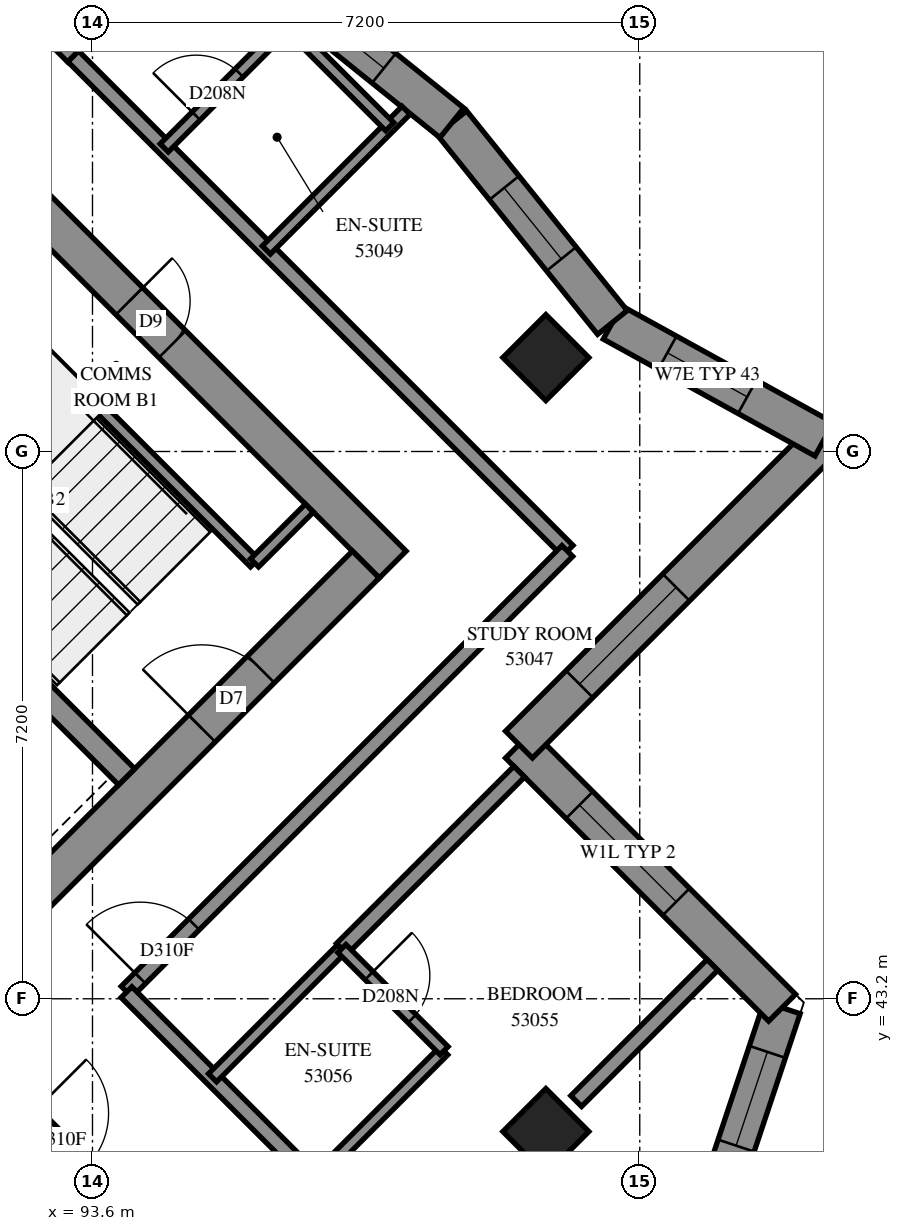
"""IFC4 building model, lengths in metres.
Left out: names, types, materials, properties, quantities, classifications, styles, units other than length and angle.
Written with IfcOpenShell. Run it as: python <this file> out.ifc"""

import sys

from ifc_helpers import new_model, si_unit, direction, frame, frame_2d, origin, origin_2d, place, context, subcontext, project, spatial, polyline, rectangle, outline, extrude, element, fill, save


model = new_model("IFC4")
c1 = context("Model", 3, precision=1e-05, world=origin(), true_north=direction((0.0, 1.0)))
c2 = subcontext(c1, "Body", "Model", "MODEL_VIEW")
j1 = project(units=[si_unit("LENGTHUNIT", "METRE"), si_unit("PLANEANGLEUNIT", "RADIAN")], contexts=[c1])
p1 = place(None, origin())
s1 = spatial("IfcSite", under=j1, at=p1, CompositionType="ELEMENT")
p2 = place(p1, origin())
s2 = spatial("IfcBuilding", under=s1, at=p2, CompositionType="ELEMENT")
p3 = place(p2, frame((0.0, 0.0, 196.4)))
s3 = spatial("IfcBuildingStorey", under=s2, at=p3, CompositionType="ELEMENT", Elevation=196.4)
for number, where, z_axis, x_axis in (
    (1, (99.565, 51.635, 0.0), (0.0, 0.0, 1.0), (0.707, -0.707, 0.0)),
    (2, (99.565, 41.453, 0.0), (0.0, 0.0, 1.0), (0.707, -0.707, 0.0)),
):
    element("IfcColumn", number, at=place(p3, frame(where, z_axis=z_axis, x_axis=x_axis)), inside=s3, PredefinedType="COLUMN", context=c2, shape_type="SweptSolid", body=[
        extrude(rectangle(XDim=0.8, YDim=0.8, at=origin_2d()), origin(), (0.0, 0.0, 1.0), 3.1),
    ])
p4 = place(p3, frame((86.66, 59.802, -0.3), z_axis=(0.0, 0.0, 1.0), x_axis=(0.7071067812, -0.7071067812, 0.0)))
e3 = element("IfcWall", 3, at=p4, inside=s3, PredefinedType="SHEAR", context=c2, shape_type="SweptSolid", body=[
    extrude(rectangle(XDim=15.4, YDim=0.5, at=frame_2d((7.7, 0.0))), origin(), (0.0, 0.0, 1.0), 2.7),
])
p5 = place(p4, frame((10.5, 0.0, 0.3)))
e4 = element("IfcOpeningElement", 4, at=p5, cuts=e3, PredefinedType="OPENING", context=c2, shape_type="SweptSolid", body=[
    extrude(rectangle(XDim=0.8, YDim=2.1, at=frame_2d((0.4, 1.05))), frame((0.0, 0.26, 0.0), z_axis=(0.0, -1.0, 0.0), x_axis=(1.0, 0.0, 0.0)), (0.0, 0.0, 1.0), 0.52),
])
p6 = place(p3, frame((87.013, 38.731, -0.3), z_axis=(0.0, 0.0, 1.0), x_axis=(0.7071067812, 0.7071067812, 0.0)))
e5 = element("IfcWall", 5, at=p6, inside=s3, PredefinedType="SHEAR", context=c2, shape_type="SweptSolid", body=[
    extrude(rectangle(XDim=14.4, YDim=0.5, at=frame_2d((7.2, 0.0))), origin(), (0.0, 0.0, 1.0), 2.7),
])
p7 = place(p6, frame((4.55, 0.0, 0.3)))
e6 = element("IfcOpeningElement", 6, at=p7, cuts=e5, PredefinedType="OPENING", context=c2, shape_type="SweptSolid", body=[
    extrude(rectangle(XDim=1.1, YDim=2.1, at=frame_2d((0.55, 1.05))), frame((0.0, 0.26, 0.0), z_axis=(0.0, -1.0, 0.0), x_axis=(1.0, 0.0, 0.0)), (0.0, 0.0, 1.0), 0.52),
])
p8 = place(p6, frame((11.35, 0.0, 0.3)))
e7 = element("IfcOpeningElement", 7, at=p8, cuts=e5, PredefinedType="OPENING", context=c2, shape_type="SweptSolid", body=[
    extrude(rectangle(XDim=1.1, YDim=2.1, at=frame_2d((0.55, 1.05))), frame((0.0, 0.26, 0.0), z_axis=(0.0, -1.0, 0.0), x_axis=(1.0, 0.0, 0.0)), (0.0, 0.0, 1.0), 0.52),
])
p9 = place(p3, frame((88.958, 51.211, 0.0), z_axis=(0.0, 0.0, 1.0), x_axis=(0.7070998367, -0.7071137256, 0.0)))
e8 = element("IfcWall", 8, at=p9, inside=s3, PredefinedType="SOLIDWALL", context=c2, shape_type="SweptSolid", body=[
    extrude(rectangle(XDim=7.2, YDim=0.3, at=frame_2d((3.6, 0.0))), origin(), (0.0, 0.0, 1.0), 3.1),
])
p10 = place(p3, frame((101.062, 38.252, 0.0), z_axis=(0.0, 0.0, 1.0), x_axis=(0.3162395484, 0.9486793705, 0.0)))
e9 = element("IfcWall", 9, at=p10, inside=s3, PredefinedType="SOLIDWALL", context=c2, shape_type="SweptSolid", body=[
    extrude(outline(polyline([(-0.12, -0.25), (5.247, -0.25), (4.938, 0.25), (0.12, 0.25), (-0.12, -0.25)])), origin(), (0.0, 0.0, 1.0), 3.1),
])
p11 = place(p10, frame((1.68, 0.0, 0.45)))
e10 = element("IfcOpeningElement", 10, at=p11, cuts=e9, PredefinedType="OPENING", context=c2, shape_type="SweptSolid", body=[
    extrude(rectangle(XDim=1.3, YDim=2.5, at=frame_2d((0.65, 1.25))), frame((0.0, 0.26, 0.0), z_axis=(0.0, -1.0, 0.0), x_axis=(1.0, 0.0, 0.0)), (0.0, 0.0, 1.0), 0.52),
])
p12 = place(p10, frame((3.18, 0.0, 0.45)))
e11 = element("IfcOpeningElement", 11, at=p12, cuts=e9, PredefinedType="OPENING", context=c2, shape_type="SweptSolid", body=[
    extrude(rectangle(XDim=1.3, YDim=2.5, at=frame_2d((0.65, 1.25))), frame((0.0, 0.26, 0.0), z_axis=(0.0, -1.0, 0.0), x_axis=(1.0, 0.0, 0.0)), (0.0, 0.0, 1.0), 0.52),
])
p13 = place(p3, frame((102.673, 43.083, 0.0), z_axis=(0.0, 0.0, 1.0), x_axis=(-0.7071067812, 0.7071067812, 0.0)))
e12 = element("IfcWall", 12, at=p13, inside=s3, PredefinedType="SOLIDWALL", context=c2, shape_type="SweptSolid", body=[
    extrude(outline(polyline([(-0.154, -0.25), (4.646, -0.25), (5.146, 0.25), (0.154, 0.25), (-0.154, -0.25)])), origin(), (0.0, 0.0, 1.0), 3.1),
])
p14 = place(p13, frame((1.97, 0.0, 0.6)))
e13 = element("IfcOpeningElement", 13, at=p14, cuts=e12, PredefinedType="OPENING", context=c2, shape_type="SweptSolid", body=[
    extrude(rectangle(XDim=1.8, YDim=1.9, at=frame_2d((0.9, 0.95))), frame((0.0, 0.26, 0.0), z_axis=(0.0, -1.0, 0.0), x_axis=(1.0, 0.0, 0.0)), (0.0, 0.0, 1.0), 0.52),
])
p15 = place(p3, frame((99.211, 46.544, 0.0), z_axis=(0.0, 0.0, 1.0), x_axis=(0.7071067812, 0.7071067812, 0.0)))
e14 = element("IfcWall", 14, at=p15, inside=s3, PredefinedType="SOLIDWALL", context=c2, shape_type="SweptSolid", body=[
    extrude(outline(polyline([(0.25, -0.25), (6.011, -0.25), (5.346, 0.25), (-0.25, 0.25), (0.25, -0.25)])), origin(), (0.0, 0.0, 1.0), 3.1),
])
p16 = place(p15, frame((1.125, 0.0, 0.6)))
e15 = element("IfcOpeningElement", 15, at=p16, cuts=e14, PredefinedType="OPENING", context=c2, shape_type="SweptSolid", body=[
    extrude(rectangle(XDim=1.8, YDim=1.9, at=frame_2d((0.9, 0.95))), frame((0.0, 0.26, 0.0), z_axis=(0.0, -1.0, 0.0), x_axis=(1.0, 0.0, 0.0)), (0.0, 0.0, 1.0), 0.52),
])
p17 = place(p3, frame((103.227, 50.56, 0.0), z_axis=(0.0, 0.0, 1.0), x_axis=(-0.8754584945, 0.483293311, 0.0)))
e16 = element("IfcWall", 16, at=p17, inside=s3, PredefinedType="SOLIDWALL", context=c2, shape_type="SweptSolid", body=[
    extrude(outline(polyline([(-0.332, -0.25), (3.133, -0.25), (3.232, 0.25), (0.332, 0.25), (-0.332, -0.25)])), origin(), (0.0, 0.0, 1.0), 3.1),
])
p18 = place(p17, frame((1.157, 0.0, 0.45)))
e17 = element("IfcOpeningElement", 17, at=p18, cuts=e16, PredefinedType="OPENING", context=c2, shape_type="SweptSolid", body=[
    extrude(rectangle(XDim=1.2, YDim=2.5, at=frame_2d((0.6, 1.25))), frame((0.0, 0.26, 0.0), z_axis=(0.0, -1.0, 0.0), x_axis=(1.0, 0.0, 0.0)), (0.0, 0.0, 1.0), 0.52),
])
p19 = place(p3, frame((100.441, 52.098, 0.0), z_axis=(0.0, 0.0, 1.0), x_axis=(-0.6267656926, 0.7792077814, 0.0)))
e18 = element("IfcWall", 18, at=p19, inside=s3, PredefinedType="SOLIDWALL", context=c2, shape_type="SweptSolid", body=[
    extrude(outline(polyline([(0.049, -0.25), (3.398, -0.25), (3.344, 0.25), (-0.049, 0.25), (0.049, -0.25)])), origin(), (0.0, 0.0, 1.0), 3.1),
])
p20 = place(p19, frame((1.072, 0.0, 0.45)))
e19 = element("IfcOpeningElement", 19, at=p20, cuts=e18, PredefinedType="OPENING", context=c2, shape_type="SweptSolid", body=[
    extrude(rectangle(XDim=1.2, YDim=2.5, at=frame_2d((0.6, 1.25))), frame((0.0, 0.26, 0.0), z_axis=(0.0, -1.0, 0.0), x_axis=(1.0, 0.0, 0.0)), (0.0, 0.0, 1.0), 0.52),
])
p21 = place(p3, frame((98.328, 54.724, 0.0), z_axis=(0.0, 0.0, 1.0), x_axis=(-0.7792172545, 0.6267539152, 0.0)))
e20 = element("IfcWall", 20, at=p21, inside=s3, PredefinedType="SOLIDWALL", context=c2, shape_type="SweptSolid", body=[
    extrude(outline(polyline([(-0.027, -0.25), (3.322, -0.25), (3.376, 0.25), (0.027, 0.25), (-0.027, -0.25)])), origin(), (0.0, 0.0, 1.0), 3.1),
])
p22 = place(p21, frame((1.147, 0.0, 0.45)))
e21 = element("IfcOpeningElement", 21, at=p22, cuts=e20, PredefinedType="OPENING", context=c2, shape_type="SweptSolid", body=[
    extrude(rectangle(XDim=1.2, YDim=2.5, at=frame_2d((0.6, 1.25))), frame((0.0, 0.26, 0.0), z_axis=(0.0, -1.0, 0.0), x_axis=(1.0, 0.0, 0.0)), (0.0, 0.0, 1.0), 0.52),
])
p23 = place(p3, frame((91.313, 53.354, 0.0), z_axis=(0.0, 0.0, 1.0), x_axis=(0.7071147811, -0.7070987812, 0.0)))
e22 = element("IfcWall", 22, at=p23, inside=s3, PredefinedType="PARTITIONING", context=c2, shape_type="SweptSolid", body=[
    extrude(rectangle(XDim=6.25, YDim=0.15, at=frame_2d((3.125, 0.0))), origin(), (0.0, 0.0, 1.0), 3.1),
])
p24 = place(p3, frame((95.732, 48.934, 0.0), z_axis=(0.0, 0.0, 1.0), x_axis=(0.7071067812, 0.7071067812, 0.0)))
e23 = element("IfcWall", 23, at=p24, inside=s3, PredefinedType="PARTITIONING", context=c2, shape_type="SweptSolid", body=[
    extrude(rectangle(XDim=1.02, YDim=0.15, at=frame_2d((0.51, 0.0))), origin(), (0.0, 0.0, 1.0), 3.1),
])
p25 = place(p3, frame((93.346, 55.599, 0.0), z_axis=(0.0, 0.0, 1.0), x_axis=(0.7071067812, -0.7071067812, 0.0)))
e24 = element("IfcWall", 24, at=p25, inside=s3, PredefinedType="PARTITIONING", context=c2, shape_type="SweptSolid", body=[
    extrude(rectangle(XDim=9.201, YDim=0.2, at=frame_2d((4.601, 0.0))), origin(), (0.0, 0.0, 1.0), 3.1),
])
p26 = place(p3, frame((94.049, 43.293, 0.0), z_axis=(0.0, 0.0, 1.0), x_axis=(0.7071067812, 0.7071067812, 0.0)))
e25 = element("IfcWall", 25, at=p26, inside=s3, PredefinedType="PARTITIONING", context=c2, shape_type="SweptSolid", body=[
    extrude(rectangle(XDim=8.2, YDim=0.2, at=frame_2d((4.1, 0.0))), origin(), (0.0, 0.0, 1.0), 3.1),
])
p27 = place(p26, frame((0.252, 0.0, 0.0)))
e26 = element("IfcOpeningElement", 26, at=p27, cuts=e25, PredefinedType="OPENING", context=c2, shape_type="SweptSolid", body=[
    extrude(rectangle(XDim=1.0, YDim=2.1, at=frame_2d((0.5, 1.05))), frame((0.0, 0.11, 0.0), z_axis=(0.0, -1.0, 0.0), x_axis=(1.0, 0.0, 0.0)), (0.0, 0.0, 1.0), 0.22),
])
p28 = place(p3, frame((94.047, 43.287, 0.0), z_axis=(0.0, 0.0, 1.0), x_axis=(0.7071067812, -0.7071067812, 0.0)))
e27 = element("IfcWall", 27, at=p28, inside=s3, PredefinedType="PARTITIONING", context=c2, shape_type="SweptSolid", body=[
    extrude(rectangle(XDim=5.199, YDim=0.2, at=frame_2d((2.599, 0.0))), origin(), (0.0, 0.0, 1.0), 3.1),
])
p29 = place(p28, frame((3.898, 0.0, 0.0)))
e28 = element("IfcOpeningElement", 28, at=p29, cuts=e27, PredefinedType="OPENING", context=c2, shape_type="SweptSolid", body=[
    extrude(rectangle(XDim=0.9, YDim=2.1, at=frame_2d((0.45, 1.05))), frame((0.0, 0.11, 0.0), z_axis=(0.0, -1.0, 0.0), x_axis=(1.0, 0.0, 0.0)), (0.0, 0.0, 1.0), 0.22),
])
p30 = place(p3, frame((92.633, 41.873, 0.0), z_axis=(0.0, 0.0, 1.0), x_axis=(0.7071067812, -0.7071067812, 0.0)))
e29 = element("IfcWall", 29, at=p30, inside=s3, PredefinedType="PARTITIONING", context=c2, shape_type="SweptSolid", body=[
    extrude(rectangle(XDim=5.199, YDim=0.2, at=frame_2d((2.599, 0.0))), origin(), (0.0, 0.0, 1.0), 3.1),
])
p31 = place(p30, frame((0.253, 0.0, 0.0)))
e30 = element("IfcOpeningElement", 30, at=p31, cuts=e29, PredefinedType="OPENING", context=c2, shape_type="SweptSolid", body=[
    extrude(rectangle(XDim=1.0, YDim=2.1, at=frame_2d((0.5, 1.05))), frame((0.0, 0.11, 0.0), z_axis=(0.0, -1.0, 0.0), x_axis=(1.0, 0.0, 0.0)), (0.0, 0.0, 1.0), 0.22),
])
p32 = place(p30, frame((3.948, 0.0, 0.0)))
e31 = element("IfcOpeningElement", 31, at=p32, cuts=e29, PredefinedType="OPENING", context=c2, shape_type="SweptSolid", body=[
    extrude(rectangle(XDim=0.9, YDim=2.1, at=frame_2d((0.45, 1.05))), frame((0.0, 0.11, 0.0), z_axis=(0.0, -1.0, 0.0), x_axis=(1.0, 0.0, 0.0)), (0.0, 0.0, 1.0), 0.22),
])
p33 = place(p3, frame((96.88, 43.856, 0.0), z_axis=(0.0, 0.0, 1.0), x_axis=(0.7074098182, 0.7068036142, 0.0)))
e32 = element("IfcWall", 32, at=p33, inside=s3, PredefinedType="PARTITIONING", context=c2, shape_type="SweptSolid", body=[
    extrude(rectangle(XDim=3.299, YDim=0.2, at=frame_2d((1.65, 0.0))), origin(), (0.0, 0.0, 1.0), 3.1),
])
p34 = place(p3, frame((95.887, 53.051, 0.0), z_axis=(0.0, 0.0, 1.0), x_axis=(0.7070875415, 0.7071260204, 0.0)))
e33 = element("IfcWall", 33, at=p34, inside=s3, PredefinedType="PARTITIONING", context=c2, shape_type="SweptSolid", body=[
    extrude(rectangle(XDim=2.599, YDim=0.15, at=frame_2d((1.299, 0.0))), origin(), (0.0, 0.0, 1.0), 3.1),
])
p35 = place(p3, frame((99.964, 41.854, 0.0), z_axis=(0.0, 0.0, 1.0), x_axis=(0.7071265121, 0.7070870497, 0.0)))
e34 = element("IfcWall", 34, at=p35, inside=s3, PredefinedType="PARTITIONING", context=c2, shape_type="SweptSolid", body=[
    extrude(rectangle(XDim=2.534, YDim=0.2, at=frame_2d((1.267, 0.0))), origin(), (0.0, 0.0, 1.0), 3.1),
])
for number, where, z_axis, x_axis in (
    (35, (96.523, 40.817, 0.0), (0.0, 0.0, 1.0), (0.707, 0.707, 0.0)),
    (36, (95.179, 42.161, 0.0), (0.0, 0.0, 1.0), (0.707, 0.707, 0.0)),
):
    element("IfcWall", number, at=place(p3, frame(where, z_axis=z_axis, x_axis=x_axis)), inside=s3, PredefinedType="PARTITIONING", context=c2, shape_type="SweptSolid", body=[
        extrude(rectangle(XDim=2.401, YDim=0.15, at=frame_2d((1.201, 0.0))), origin(), (0.0, 0.0, 1.0), 3.1),
    ])
p36 = place(p3, frame((94.544, 54.394, 0.0), z_axis=(0.0, 0.0, 1.0), x_axis=(0.7070858847, 0.7071276771, 0.0)))
e37 = element("IfcWall", 37, at=p36, inside=s3, PredefinedType="PARTITIONING", context=c2, shape_type="SweptSolid", body=[
    extrude(rectangle(XDim=2.393, YDim=0.15, at=frame_2d((1.196, 0.0))), origin(), (0.0, 0.0, 1.0), 3.1),
])
p37 = place(p36, frame((0.594, 0.0, 0.0)))
e38 = element("IfcOpeningElement", 38, at=p37, cuts=e37, PredefinedType="OPENING", context=c2, shape_type="SweptSolid", body=[
    extrude(rectangle(XDim=0.8, YDim=2.1, at=frame_2d((0.4, 1.05))), frame((0.0, 0.085, 0.0), z_axis=(0.0, -1.0, 0.0), x_axis=(1.0, 0.0, 0.0)), (0.0, 0.0, 1.0), 0.17),
])
p38 = place(p3, frame((96.167, 56.017, 0.0), z_axis=(0.0, 0.0, 1.0), x_axis=(0.7071067812, -0.7071067812, 0.0)))
e39 = element("IfcWall", 39, at=p38, inside=s3, PredefinedType="PARTITIONING", context=c2, shape_type="SweptSolid", body=[
    extrude(rectangle(XDim=1.901, YDim=0.15, at=frame_2d((0.95, 0.0))), origin(), (0.0, 0.0, 1.0), 3.1),
])
p39 = place(p3, frame((96.881, 43.861, 0.0), z_axis=(0.0, 0.0, 1.0), x_axis=(0.7071067812, -0.7071067812, 0.0)))
e40 = element("IfcWall", 40, at=p39, inside=s3, PredefinedType="PARTITIONING", context=c2, shape_type="SweptSolid", body=[
    extrude(rectangle(XDim=1.901, YDim=0.15, at=frame_2d((0.95, 0.0))), origin(), (0.0, 0.0, 1.0), 3.1),
])
p40 = place(p39, frame((0.505, 0.0, 0.0)))
e41 = element("IfcOpeningElement", 41, at=p40, cuts=e40, PredefinedType="OPENING", context=c2, shape_type="SweptSolid", body=[
    extrude(rectangle(XDim=0.8, YDim=2.1, at=frame_2d((0.4, 1.05))), frame((0.0, 0.085, 0.0), z_axis=(0.0, -1.0, 0.0), x_axis=(1.0, 0.0, 0.0)), (0.0, 0.0, 1.0), 0.17),
])
p41 = place(p3, frame((92.311, 56.627, 0.0), z_axis=(0.0, 0.0, 1.0), x_axis=(0.7077922938, -0.7064206033, 0.0)))
e42 = element("IfcWall", 42, at=p41, inside=s3, PredefinedType="PARTITIONING", context=c2, shape_type="SweptSolid", body=[
    extrude(rectangle(XDim=1.458, YDim=0.2, at=frame_2d((0.729, 0.0))), origin(), (0.0, 0.0, 1.0), 3.1),
])
p42 = place(p12, origin())
e43 = element("IfcWindow", 43, at=p42, inside=s3, PartitioningType="SINGLE_PANEL", PredefinedType="WINDOW", context=c2, shape_type="SweptSolid", body=[
    extrude(rectangle(XDim=1.3, YDim=2.5, at=frame_2d((0.65, 1.25))), frame((0.0, 0.18, 0.0), z_axis=(0.0, -1.0, 0.0), x_axis=(1.0, 0.0, 0.0)), (0.0, 0.0, 1.0), 0.06),
])
fill(e11, e43)
p43 = place(p14, origin())
e44 = element("IfcWindow", 44, at=p43, inside=s3, PartitioningType="SINGLE_PANEL", PredefinedType="WINDOW", context=c2, shape_type="SweptSolid", body=[
    extrude(rectangle(XDim=1.8, YDim=1.9, at=frame_2d((0.9, 0.95))), frame((0.0, 0.18, 0.0), z_axis=(0.0, -1.0, 0.0), x_axis=(1.0, 0.0, 0.0)), (0.0, 0.0, 1.0), 0.06),
])
fill(e13, e44)
p44 = place(p16, origin())
e45 = element("IfcWindow", 45, at=p44, inside=s3, PartitioningType="SINGLE_PANEL", PredefinedType="WINDOW", context=c2, shape_type="SweptSolid", body=[
    extrude(rectangle(XDim=1.8, YDim=1.9, at=frame_2d((0.9, 0.95))), frame((0.0, 0.18, 0.0), z_axis=(0.0, -1.0, 0.0), x_axis=(1.0, 0.0, 0.0)), (0.0, 0.0, 1.0), 0.06),
])
fill(e15, e45)
p45 = place(p18, origin())
e46 = element("IfcWindow", 46, at=p45, inside=s3, PartitioningType="SINGLE_PANEL", PredefinedType="WINDOW", context=c2, shape_type="SweptSolid", body=[
    extrude(rectangle(XDim=1.2, YDim=2.5, at=frame_2d((0.6, 1.25))), frame((0.0, 0.18, 0.0), z_axis=(0.0, -1.0, 0.0), x_axis=(1.0, 0.0, 0.0)), (0.0, 0.0, 1.0), 0.06),
])
fill(e17, e46)
p46 = place(p20, origin())
e47 = element("IfcWindow", 47, at=p46, inside=s3, PartitioningType="SINGLE_PANEL", PredefinedType="WINDOW", context=c2, shape_type="SweptSolid", body=[
    extrude(rectangle(XDim=1.2, YDim=2.5, at=frame_2d((0.6, 1.25))), frame((0.0, 0.18, 0.0), z_axis=(0.0, -1.0, 0.0), x_axis=(1.0, 0.0, 0.0)), (0.0, 0.0, 1.0), 0.06),
])
fill(e19, e47)
p47 = place(p22, origin())
e48 = element("IfcWindow", 48, at=p47, inside=s3, PartitioningType="SINGLE_PANEL", PredefinedType="WINDOW", context=c2, shape_type="SweptSolid", body=[
    extrude(rectangle(XDim=1.2, YDim=2.5, at=frame_2d((0.6, 1.25))), frame((0.0, 0.18, 0.0), z_axis=(0.0, -1.0, 0.0), x_axis=(1.0, 0.0, 0.0)), (0.0, 0.0, 1.0), 0.06),
])
fill(e21, e48)
p48 = place(p5, origin())
e49 = element("IfcDoor", 49, at=p48, inside=s3, OperationType="SINGLE_SWING_RIGHT", PredefinedType="DOOR", context=c2, shape_type="SweptSolid", body=[
    extrude(rectangle(XDim=0.8, YDim=2.1, at=frame_2d((0.4, 1.05))), frame((0.0, 0.025, 0.0), z_axis=(0.0, -1.0, 0.0), x_axis=(1.0, 0.0, 0.0)), (0.0, 0.0, 1.0), 0.05),
])
fill(e4, e49)
p49 = place(p8, origin())
e50 = element("IfcDoor", 50, at=p49, inside=s3, OperationType="SINGLE_SWING_RIGHT", PredefinedType="DOOR", context=c2, shape_type="SweptSolid", body=[
    extrude(rectangle(XDim=1.1, YDim=2.1, at=frame_2d((0.55, 1.05))), frame((0.0, 0.025, 0.0), z_axis=(0.0, -1.0, 0.0), x_axis=(1.0, 0.0, 0.0)), (0.0, 0.0, 1.0), 0.05),
])
fill(e7, e50)
p50 = place(p27, origin())
e51 = element("IfcDoor", 51, at=p50, inside=s3, OperationType="SINGLE_SWING_RIGHT", PredefinedType="DOOR", context=c2, shape_type="SweptSolid", body=[
    extrude(rectangle(XDim=1.0, YDim=2.1, at=frame_2d((0.5, 1.05))), frame((0.0, 0.025, 0.0), z_axis=(0.0, -1.0, 0.0), x_axis=(1.0, 0.0, 0.0)), (0.0, 0.0, 1.0), 0.05),
])
fill(e26, e51)
p51 = place(p37, origin())
e52 = element("IfcDoor", 52, at=p51, inside=s3, OperationType="SINGLE_SWING_RIGHT", PredefinedType="DOOR", context=c2, shape_type="SweptSolid", body=[
    extrude(rectangle(XDim=0.8, YDim=2.1, at=frame_2d((0.4, 1.05))), frame((0.0, 0.025, 0.0), z_axis=(0.0, -1.0, 0.0), x_axis=(1.0, 0.0, 0.0)), (0.0, 0.0, 1.0), 0.05),
])
fill(e38, e52)
p52 = place(p31, origin())
e53 = element("IfcDoor", 53, at=p52, inside=s3, OperationType="SINGLE_SWING_RIGHT", PredefinedType="DOOR", context=c2, shape_type="SweptSolid", body=[
    extrude(rectangle(XDim=1.0, YDim=2.1, at=frame_2d((0.5, 1.05))), frame((0.0, 0.025, 0.0), z_axis=(0.0, -1.0, 0.0), x_axis=(1.0, 0.0, 0.0)), (0.0, 0.0, 1.0), 0.05),
])
fill(e30, e53)
p53 = place(p40, origin())
e54 = element("IfcDoor", 54, at=p53, inside=s3, OperationType="SINGLE_SWING_RIGHT", PredefinedType="DOOR", context=c2, shape_type="SweptSolid", body=[
    extrude(rectangle(XDim=0.8, YDim=2.1, at=frame_2d((0.4, 1.05))), frame((0.0, 0.025, 0.0), z_axis=(0.0, -1.0, 0.0), x_axis=(1.0, 0.0, 0.0)), (0.0, 0.0, 1.0), 0.05),
])
fill(e41, e54)
save(model, sys.argv[1])
